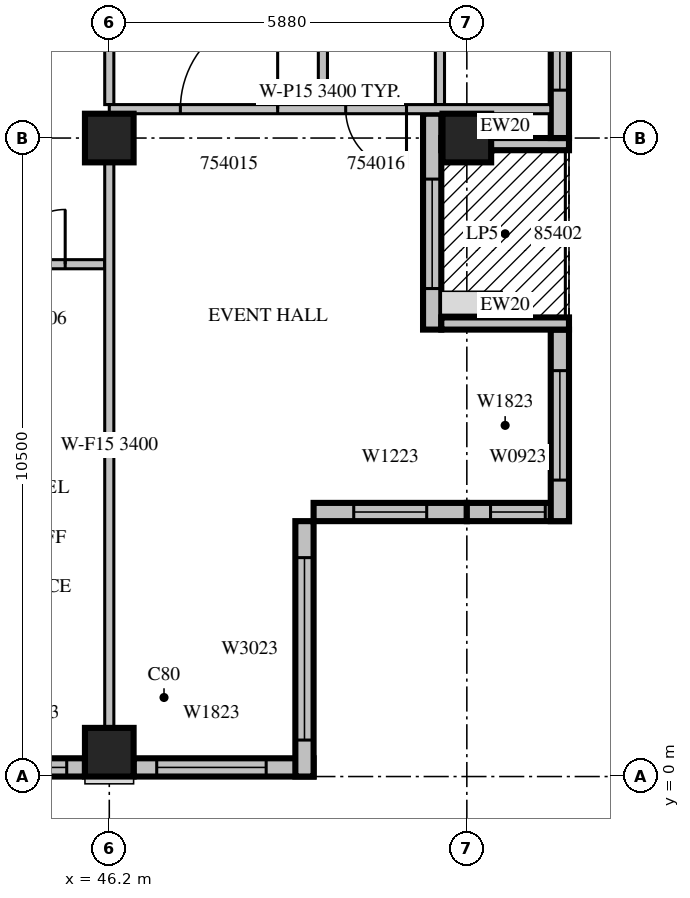
"""IFC4 building model, lengths in metres.
Left out: names, types, materials, properties, quantities, classifications, styles, units other than length and angle.
Written with IfcOpenShell. Run it as: python <this file> out.ifc"""

import sys

from ifc_helpers import new_model, si_unit, direction, frame, frame_2d, origin, origin_2d, place, context, subcontext, project, spatial, rectangle, extrude, source, transform, mapped, element, fill, save


model = new_model("IFC4")
c1 = context("Model", 3, precision=1e-05, world=origin(), true_north=direction((0.0, 1.0)))
c2 = subcontext(c1, "Body", "Model", "MODEL_VIEW")
j1 = project(units=[si_unit("LENGTHUNIT", "METRE"), si_unit("PLANEANGLEUNIT", "RADIAN")], contexts=[c1])
p1 = place(None, origin())
s1 = spatial("IfcSite", under=j1, at=p1, CompositionType="ELEMENT")
p2 = place(p1, origin())
s2 = spatial("IfcBuilding", under=s1, at=p2, CompositionType="ELEMENT")
p3 = place(p2, frame((0.0, 0.0, 238.6)))
s3 = spatial("IfcBuildingStorey", under=s2, at=p3, CompositionType="ELEMENT", Elevation=238.6)
m1 = source(origin(), c2, "Body", "SweptSolid", [
    extrude(rectangle(XDim=0.8, YDim=0.8, at=origin_2d()), origin(), (0.0, 0.0, 1.0), 3.8),
])
for number, where, z_axis, x_axis in (
    (1, (46.2, 0.4, 0.0), (0.0, 0.0, 1.0), (1.0, 0.0, 0.0)),
    (2, (46.2, 10.5, 0.0), (0.0, 0.0, 1.0), (1.0, 0.0, 0.0)),
    (3, (52.08, 10.5, 0.0), (0.0, 0.0, 1.0), (1.0, 0.0, 0.0)),
):
    element("IfcColumn", number, at=place(p3, frame(where, z_axis=z_axis, x_axis=x_axis)), inside=s3, PredefinedType="COLUMN", context=c2, shape_type="MappedRepresentation", body=[
        mapped(m1, transform((0.0, 0.0, 0.0), scale=1.0)),
    ])
m2 = source(origin(), c2, "Body", "SweptSolid", [
    extrude(rectangle(XDim=1.8, YDim=0.3, at=frame_2d((0.9, 0.0))), origin(), (0.0, 0.0, 1.0), 3.4),
])
p4 = place(p3, frame((44.0, 0.15, 0.0), z_axis=(0.0, 0.0, 1.0), x_axis=(1.0, 0.0, 0.0)))
e4 = element("IfcWall", 4, at=p4, inside=s3, PredefinedType="STANDARD", context=c2, shape_type="MappedRepresentation", body=[
    mapped(m2, transform((0.0, 0.0, 0.0), scale=1.0)),
])
m3 = source(origin(), c2, "Body", "SweptSolid", [
    extrude(rectangle(XDim=1.2, YDim=2.3, at=frame_2d((0.6, 1.15))), frame((0.0, 0.16, 0.0), z_axis=(0.0, -1.0, 0.0), x_axis=(1.0, 0.0, 0.0)), (0.0, 0.0, 1.0), 0.32),
])
p5 = place(p4, frame((0.3, 0.0, 0.6)))
e5 = element("IfcOpeningElement", 5, at=p5, cuts=e4, PredefinedType="OPENING", context=c2, shape_type="MappedRepresentation", body=[
    mapped(m3, transform((0.0, 0.0, 0.0), scale=1.0)),
])
m4 = source(origin(), c2, "Body", "SweptSolid", [
    extrude(rectangle(XDim=2.96, YDim=0.3, at=frame_2d((1.48, 0.0))), origin(), (0.0, 0.0, 1.0), 3.4),
])
p6 = place(p3, frame((46.6, 0.15, 0.0), z_axis=(0.0, 0.0, 1.0), x_axis=(1.0, 0.0, 0.0)))
e6 = element("IfcWall", 6, at=p6, inside=s3, PredefinedType="STANDARD", context=c2, shape_type="MappedRepresentation", body=[
    mapped(m4, transform((0.0, 0.0, 0.0), scale=1.0)),
])
m5 = source(origin(), c2, "Body", "SweptSolid", [
    extrude(rectangle(XDim=1.8, YDim=2.3, at=frame_2d((0.9, 1.15))), frame((0.0, 0.16, 0.0), z_axis=(0.0, -1.0, 0.0), x_axis=(1.0, 0.0, 0.0)), (0.0, 0.0, 1.0), 0.32),
])
p7 = place(p6, frame((0.38, 0.0, 0.6)))
e7 = element("IfcOpeningElement", 7, at=p7, cuts=e6, PredefinedType="OPENING", context=c2, shape_type="MappedRepresentation", body=[
    mapped(m5, transform((0.0, 0.0, 0.0), scale=1.0)),
])
m6 = source(origin(), c2, "Body", "SweptSolid", [
    extrude(rectangle(XDim=4.2, YDim=0.3, at=frame_2d((2.1, 0.0))), origin(), (0.0, 0.0, 1.0), 3.4),
])
p8 = place(p3, frame((49.41, 0.0, 0.0), z_axis=(0.0, 0.0, 1.0), x_axis=(0.0, 1.0, 0.0)))
e8 = element("IfcWall", 8, at=p8, inside=s3, PredefinedType="STANDARD", context=c2, shape_type="MappedRepresentation", body=[
    mapped(m6, transform((0.0, 0.0, 0.0), scale=1.0)),
])
m7 = source(origin(), c2, "Body", "SweptSolid", [
    extrude(rectangle(XDim=3.0, YDim=2.3, at=frame_2d((1.5, 1.15))), frame((0.0, 0.16, 0.0), z_axis=(0.0, -1.0, 0.0), x_axis=(1.0, 0.0, 0.0)), (0.0, 0.0, 1.0), 0.32),
])
p9 = place(p8, frame((0.6, 0.0, 0.6)))
e9 = element("IfcOpeningElement", 9, at=p9, cuts=e8, PredefinedType="OPENING", context=c2, shape_type="MappedRepresentation", body=[
    mapped(m7, transform((0.0, 0.0, 0.0), scale=1.0)),
])
m8 = source(origin(), c2, "Body", "SweptSolid", [
    extrude(rectangle(XDim=2.52, YDim=0.3, at=frame_2d((1.26, 0.0))), origin(), (0.0, 0.0, 1.0), 3.4),
])
p10 = place(p3, frame((49.56, 4.35, 0.0), z_axis=(0.0, 0.0, 1.0), x_axis=(1.0, 0.0, 0.0)))
e10 = element("IfcWall", 10, at=p10, inside=s3, PredefinedType="STANDARD", context=c2, shape_type="MappedRepresentation", body=[
    mapped(m8, transform((0.0, 0.0, 0.0), scale=1.0)),
])
p11 = place(p10, frame((0.66, 0.0, 0.6)))
e11 = element("IfcOpeningElement", 11, at=p11, cuts=e10, PredefinedType="OPENING", context=c2, shape_type="MappedRepresentation", body=[
    mapped(m3, transform((0.0, 0.0, 0.0), scale=1.0)),
])
m9 = source(origin(), c2, "Body", "SweptSolid", [
    extrude(rectangle(XDim=1.68, YDim=0.3, at=frame_2d((0.84, 0.0))), origin(), (0.0, 0.0, 1.0), 3.4),
])
p12 = place(p3, frame((52.08, 4.35, 0.0), z_axis=(0.0, 0.0, 1.0), x_axis=(1.0, 0.0, 0.0)))
e12 = element("IfcWall", 12, at=p12, inside=s3, PredefinedType="STANDARD", context=c2, shape_type="MappedRepresentation", body=[
    mapped(m9, transform((0.0, 0.0, 0.0), scale=1.0)),
])
m10 = source(origin(), c2, "Body", "SweptSolid", [
    extrude(rectangle(XDim=0.9, YDim=2.3, at=frame_2d((0.45, 1.15))), frame((0.0, 0.16, 0.0), z_axis=(0.0, -1.0, 0.0), x_axis=(1.0, 0.0, 0.0)), (0.0, 0.0, 1.0), 0.32),
])
p13 = place(p12, frame((0.39, 0.0, 0.6)))
e13 = element("IfcOpeningElement", 13, at=p13, cuts=e12, PredefinedType="OPENING", context=c2, shape_type="MappedRepresentation", body=[
    mapped(m10, transform((0.0, 0.0, 0.0), scale=1.0)),
])
m11 = source(origin(), c2, "Body", "SweptSolid", [
    extrude(rectangle(XDim=3.15, YDim=0.3, at=frame_2d((1.575, 0.0))), origin(), (0.0, 0.0, 1.0), 3.4),
])
p14 = place(p3, frame((53.61, 4.2, 0.0), z_axis=(0.0, 0.0, 1.0), x_axis=(0.0, 1.0, 0.0)))
e14 = element("IfcWall", 14, at=p14, inside=s3, PredefinedType="STANDARD", context=c2, shape_type="MappedRepresentation", body=[
    mapped(m11, transform((0.0, 0.0, 0.0), scale=1.0)),
])
p15 = place(p14, frame((0.675, 0.0, 0.6)))
e15 = element("IfcOpeningElement", 15, at=p15, cuts=e14, PredefinedType="OPENING", context=c2, shape_type="MappedRepresentation", body=[
    mapped(m5, transform((0.0, 0.0, 0.0), scale=1.0)),
])
m12 = source(origin(), c2, "Body", "SweptSolid", [
    extrude(rectangle(XDim=3.55, YDim=0.3, at=frame_2d((1.775, 0.0))), origin(), (0.0, 0.0, 1.0), 3.4),
])
p16 = place(p3, frame((51.51, 7.35, 0.0), z_axis=(0.0, 0.0, 1.0), x_axis=(0.0, 1.0, 0.0)))
e16 = element("IfcWall", 16, at=p16, inside=s3, PredefinedType="STANDARD", context=c2, shape_type="MappedRepresentation", body=[
    mapped(m12, transform((0.0, 0.0, 0.0), scale=1.0)),
])
m13 = source(origin(), c2, "Body", "SweptSolid", [
    extrude(rectangle(XDim=1.8, YDim=2.4, at=frame_2d((0.9, 1.2))), frame((0.0, 0.16, 0.0), z_axis=(0.0, -1.0, 0.0), x_axis=(1.0, 0.0, 0.0)), (0.0, 0.0, 1.0), 0.32),
])
p17 = place(p16, frame((0.675, 0.0, 0.0)))
e17 = element("IfcOpeningElement", 17, at=p17, cuts=e16, PredefinedType="OPENING", context=c2, shape_type="MappedRepresentation", body=[
    mapped(m13, transform((0.0, 0.0, 0.0), scale=1.0)),
])
m14 = source(origin(), c2, "Body", "SweptSolid", [
    extrude(rectangle(XDim=2.1, YDim=0.2, at=frame_2d((1.05, 0.0))), origin(), (0.0, 0.0, 1.0), 3.4),
])
for number, where, z_axis, x_axis in (
    (18, (53.76, 7.45, 0.0), (0.0, 0.0, 1.0), (-1.0, 0.0, 0.0)),
    (19, (53.76, 10.4, 0.0), (0.0, 0.0, 1.0), (-1.0, 0.0, 0.0)),
):
    element("IfcWall", number, at=place(p3, frame(where, z_axis=z_axis, x_axis=x_axis)), inside=s3, PredefinedType="STANDARD", context=c2, shape_type="MappedRepresentation", body=[
        mapped(m14, transform((0.0, 0.0, 0.0), scale=1.0)),
    ])
m15 = source(origin(), c2, "Body", "SweptSolid", [
    extrude(rectangle(XDim=6.75, YDim=0.3, at=frame_2d((3.375, 0.0))), origin(), (0.0, 0.0, 1.0), 3.4),
])
p18 = place(p3, frame((53.61, 10.5, 0.0), z_axis=(0.0, 0.0, 1.0), x_axis=(0.0, 1.0, 0.0)))
e20 = element("IfcWall", 20, at=p18, inside=s3, PredefinedType="STANDARD", context=c2, shape_type="MappedRepresentation", body=[
    mapped(m15, transform((0.0, 0.0, 0.0), scale=1.0)),
])
p19 = place(p18, frame((0.787, 0.0, 0.6)))
e21 = element("IfcOpeningElement", 21, at=p19, cuts=e20, PredefinedType="OPENING", context=c2, shape_type="MappedRepresentation", body=[
    mapped(m5, transform((0.0, 0.0, 0.0), scale=1.0)),
])
p20 = place(p18, frame((4.606, 0.0, 0.6)))
e22 = element("IfcOpeningElement", 22, at=p20, cuts=e20, PredefinedType="OPENING", context=c2, shape_type="MappedRepresentation", body=[
    mapped(m3, transform((0.0, 0.0, 0.0), scale=1.0)),
])
m16 = source(origin(), c2, "Body", "SweptSolid", [
    extrude(rectangle(XDim=2.2, YDim=0.15, at=frame_2d((1.1, 0.0))), origin(), (0.0, 0.0, 1.0), 3.4),
])
p21 = place(p3, frame((46.125, 8.425, 0.0), z_axis=(0.0, 0.0, 1.0), x_axis=(-1.0, 0.0, 0.0)))
e23 = element("IfcWall", 23, at=p21, inside=s3, PredefinedType="PARTITIONING", context=c2, shape_type="MappedRepresentation", body=[
    mapped(m16, transform((0.0, 0.0, 0.0), scale=1.0)),
])
m17 = source(origin(), c2, "Body", "SweptSolid", [
    extrude(rectangle(XDim=0.9, YDim=2.1, at=frame_2d((0.45, 1.05))), frame((0.0, 0.085, 0.0), z_axis=(0.0, -1.0, 0.0), x_axis=(1.0, 0.0, 0.0)), (0.0, 0.0, 1.0), 0.17),
])
p22 = place(p21, frame((0.65, 0.0, 0.0)))
e24 = element("IfcOpeningElement", 24, at=p22, cuts=e23, PredefinedType="OPENING", context=c2, shape_type="MappedRepresentation", body=[
    mapped(m17, transform((0.0, 0.0, 0.0), scale=1.0)),
])
m18 = source(origin(), c2, "Body", "SweptSolid", [
    extrude(rectangle(XDim=3.65, YDim=0.15, at=frame_2d((1.825, 0.0))), origin(), (0.0, 0.0, 1.0), 3.4),
])
for number, where, z_axis, x_axis in (
    (25, (49.713, 11.05, 0.0), (0.0, 0.0, 1.0), (0.0, 1.0, 0.0)),
    (26, (51.638, 11.05, 0.0), (0.0, 0.0, 1.0), (0.0, 1.0, 0.0)),
):
    element("IfcWall", number, at=place(p3, frame(where, z_axis=z_axis, x_axis=x_axis)), inside=s3, PredefinedType="PARTITIONING", context=c2, shape_type="MappedRepresentation", body=[
        mapped(m18, transform((0.0, 0.0, 0.0), scale=1.0)),
    ])
m19 = source(origin(), c2, "Body", "SweptSolid", [
    extrude(rectangle(XDim=9.302, YDim=0.15, at=frame_2d((4.651, 0.0))), origin(), (0.0, 0.0, 1.0), 3.4),
])
p23 = place(p3, frame((46.2, 0.799, 0.0), z_axis=(0.0, 0.0, 1.0), x_axis=(0.0, 1.0, 0.0)))
e27 = element("IfcWall", 27, at=p23, inside=s3, PredefinedType="PARTITIONING", context=c2, shape_type="MappedRepresentation", body=[
    mapped(m19, transform((0.0, 0.0, 0.0), scale=1.0)),
])
p24 = place(p3, frame((46.2, 11.05, 0.0), z_axis=(0.0, 0.0, 1.0), x_axis=(0.0, 1.0, 0.0)))
e28 = element("IfcWall", 28, at=p24, inside=s3, PredefinedType="PARTITIONING", context=c2, shape_type="MappedRepresentation", body=[
    mapped(m18, transform((0.0, 0.0, 0.0), scale=1.0)),
])
m20 = source(origin(), c2, "Body", "SweptSolid", [
    extrude(rectangle(XDim=7.26, YDim=0.15, at=frame_2d((3.63, 0.0))), origin(), (0.0, 0.0, 1.0), 3.4),
])
p25 = place(p3, frame((53.46, 10.975, 0.0), z_axis=(0.0, 0.0, 1.0), x_axis=(-1.0, 0.0, 0.0)))
e29 = element("IfcWall", 29, at=p25, inside=s3, PredefinedType="PARTITIONING", context=c2, shape_type="MappedRepresentation", body=[
    mapped(m20, transform((0.0, 0.0, 0.0), scale=1.0)),
])
m21 = source(origin(), c2, "Body", "SweptSolid", [
    extrude(rectangle(XDim=1.6, YDim=2.1, at=frame_2d((0.8, 1.05))), frame((0.0, 0.085, 0.0), z_axis=(0.0, -1.0, 0.0), x_axis=(1.0, 0.0, 0.0)), (0.0, 0.0, 1.0), 0.17),
])
p26 = place(p25, frame((4.491, 0.0, 0.0)))
e30 = element("IfcOpeningElement", 30, at=p26, cuts=e29, PredefinedType="OPENING", context=c2, shape_type="MappedRepresentation", body=[
    mapped(m21, transform((0.0, 0.0, 0.0), scale=1.0)),
])
m22 = source(origin(), c2, "Body", "SweptSolid", [
    extrude(rectangle(XDim=1.0, YDim=2.1, at=frame_2d((0.5, 1.05))), frame((0.0, 0.085, 0.0), z_axis=(0.0, -1.0, 0.0), x_axis=(1.0, 0.0, 0.0)), (0.0, 0.0, 1.0), 0.17),
])
p27 = place(p25, frame((2.372, 0.0, 0.0)))
e31 = element("IfcOpeningElement", 31, at=p27, cuts=e29, PredefinedType="OPENING", context=c2, shape_type="MappedRepresentation", body=[
    mapped(m22, transform((0.0, 0.0, 0.0), scale=1.0)),
])
m23 = source(origin(), c2, "Body", "SweptSolid", [
    extrude(rectangle(XDim=1.2, YDim=2.3, at=frame_2d((0.6, 1.15))), frame((0.0, 0.03, 0.0), z_axis=(0.0, -1.0, 0.0), x_axis=(1.0, 0.0, 0.0)), (0.0, 0.0, 1.0), 0.06),
])
p28 = place(p5, origin())
e32 = element("IfcWindow", 32, at=p28, inside=s3, PartitioningType="SINGLE_PANEL", PredefinedType="WINDOW", context=c2, shape_type="MappedRepresentation", body=[
    mapped(m23, transform((0.0, 0.0, 0.0), scale=1.0)),
])
fill(e5, e32)
m24 = source(origin(), c2, "Body", "SweptSolid", [
    extrude(rectangle(XDim=1.8, YDim=2.3, at=frame_2d((0.9, 1.15))), frame((0.0, 0.03, 0.0), z_axis=(0.0, -1.0, 0.0), x_axis=(1.0, 0.0, 0.0)), (0.0, 0.0, 1.0), 0.06),
])
p29 = place(p7, origin())
e33 = element("IfcWindow", 33, at=p29, inside=s3, PartitioningType="SINGLE_PANEL", PredefinedType="WINDOW", context=c2, shape_type="MappedRepresentation", body=[
    mapped(m24, transform((0.0, 0.0, 0.0), scale=1.0)),
])
fill(e7, e33)
m25 = source(origin(), c2, "Body", "SweptSolid", [
    extrude(rectangle(XDim=3.0, YDim=2.3, at=frame_2d((1.5, 1.15))), frame((0.0, 0.03, 0.0), z_axis=(0.0, -1.0, 0.0), x_axis=(1.0, 0.0, 0.0)), (0.0, 0.0, 1.0), 0.06),
])
p30 = place(p9, origin())
e34 = element("IfcWindow", 34, at=p30, inside=s3, PartitioningType="SINGLE_PANEL", PredefinedType="WINDOW", context=c2, shape_type="MappedRepresentation", body=[
    mapped(m25, transform((0.0, 0.0, 0.0), scale=1.0)),
])
fill(e9, e34)
p31 = place(p11, origin())
e35 = element("IfcWindow", 35, at=p31, inside=s3, PartitioningType="SINGLE_PANEL", PredefinedType="WINDOW", context=c2, shape_type="MappedRepresentation", body=[
    mapped(m23, transform((0.0, 0.0, 0.0), scale=1.0)),
])
fill(e11, e35)
m26 = source(origin(), c2, "Body", "SweptSolid", [
    extrude(rectangle(XDim=0.9, YDim=2.3, at=frame_2d((0.45, 1.15))), frame((0.0, 0.03, 0.0), z_axis=(0.0, -1.0, 0.0), x_axis=(1.0, 0.0, 0.0)), (0.0, 0.0, 1.0), 0.06),
])
p32 = place(p13, origin())
e36 = element("IfcWindow", 36, at=p32, inside=s3, PartitioningType="SINGLE_PANEL", PredefinedType="WINDOW", context=c2, shape_type="MappedRepresentation", body=[
    mapped(m26, transform((0.0, 0.0, 0.0), scale=1.0)),
])
fill(e13, e36)
p33 = place(p15, origin())
e37 = element("IfcWindow", 37, at=p33, inside=s3, PartitioningType="SINGLE_PANEL", PredefinedType="WINDOW", context=c2, shape_type="MappedRepresentation", body=[
    mapped(m24, transform((0.0, 0.0, 0.0), scale=1.0)),
])
fill(e15, e37)
m27 = source(origin(), c2, "Body", "SweptSolid", [
    extrude(rectangle(XDim=1.8, YDim=2.4, at=frame_2d((0.9, 1.2))), frame((0.0, 0.025, 0.0), z_axis=(0.0, -1.0, 0.0), x_axis=(1.0, 0.0, 0.0)), (0.0, 0.0, 1.0), 0.05),
])
p34 = place(p17, origin())
e38 = element("IfcDoor", 38, at=p34, inside=s3, OperationType="SLIDING_TO_LEFT", PredefinedType="DOOR", context=c2, shape_type="MappedRepresentation", body=[
    mapped(m27, transform((0.0, 0.0, 0.0), scale=1.0)),
])
fill(e17, e38)
p35 = place(p19, origin())
e39 = element("IfcWindow", 39, at=p35, inside=s3, PartitioningType="SINGLE_PANEL", PredefinedType="WINDOW", context=c2, shape_type="MappedRepresentation", body=[
    mapped(m24, transform((0.0, 0.0, 0.0), scale=1.0)),
])
fill(e21, e39)
m28 = source(origin(), c2, "Body", "SweptSolid", [
    extrude(rectangle(XDim=0.9, YDim=2.1, at=frame_2d((0.45, 1.05))), frame((0.0, 0.025, 0.0), z_axis=(0.0, -1.0, 0.0), x_axis=(1.0, 0.0, 0.0)), (0.0, 0.0, 1.0), 0.05),
])
p36 = place(p22, origin())
e40 = element("IfcDoor", 40, at=p36, inside=s3, OperationType="SINGLE_SWING_RIGHT", PredefinedType="DOOR", context=c2, shape_type="MappedRepresentation", body=[
    mapped(m28, transform((0.0, 0.0, 0.0), scale=1.0)),
])
fill(e24, e40)
m29 = source(origin(), c2, "Body", "SweptSolid", [
    extrude(rectangle(XDim=1.6, YDim=2.1, at=frame_2d((0.8, 1.05))), frame((0.0, 0.025, 0.0), z_axis=(0.0, -1.0, 0.0), x_axis=(1.0, 0.0, 0.0)), (0.0, 0.0, 1.0), 0.05),
])
p37 = place(p26, origin())
e41 = element("IfcDoor", 41, at=p37, inside=s3, OperationType="SINGLE_SWING_RIGHT", PredefinedType="DOOR", context=c2, shape_type="MappedRepresentation", body=[
    mapped(m29, transform((0.0, 0.0, 0.0), scale=1.0)),
])
fill(e30, e41)
m30 = source(origin(), c2, "Body", "SweptSolid", [
    extrude(rectangle(XDim=1.0, YDim=2.1, at=frame_2d((0.5, 1.05))), frame((0.0, 0.025, 0.0), z_axis=(0.0, -1.0, 0.0), x_axis=(1.0, 0.0, 0.0)), (0.0, 0.0, 1.0), 0.05),
])
p38 = place(p27, origin())
e42 = element("IfcDoor", 42, at=p38, inside=s3, OperationType="SINGLE_SWING_LEFT", PredefinedType="DOOR", context=c2, shape_type="MappedRepresentation", body=[
    mapped(m30, transform((0.0, 0.0, 0.0), scale=1.0)),
])
fill(e31, e42)
save(model, sys.argv[1])
